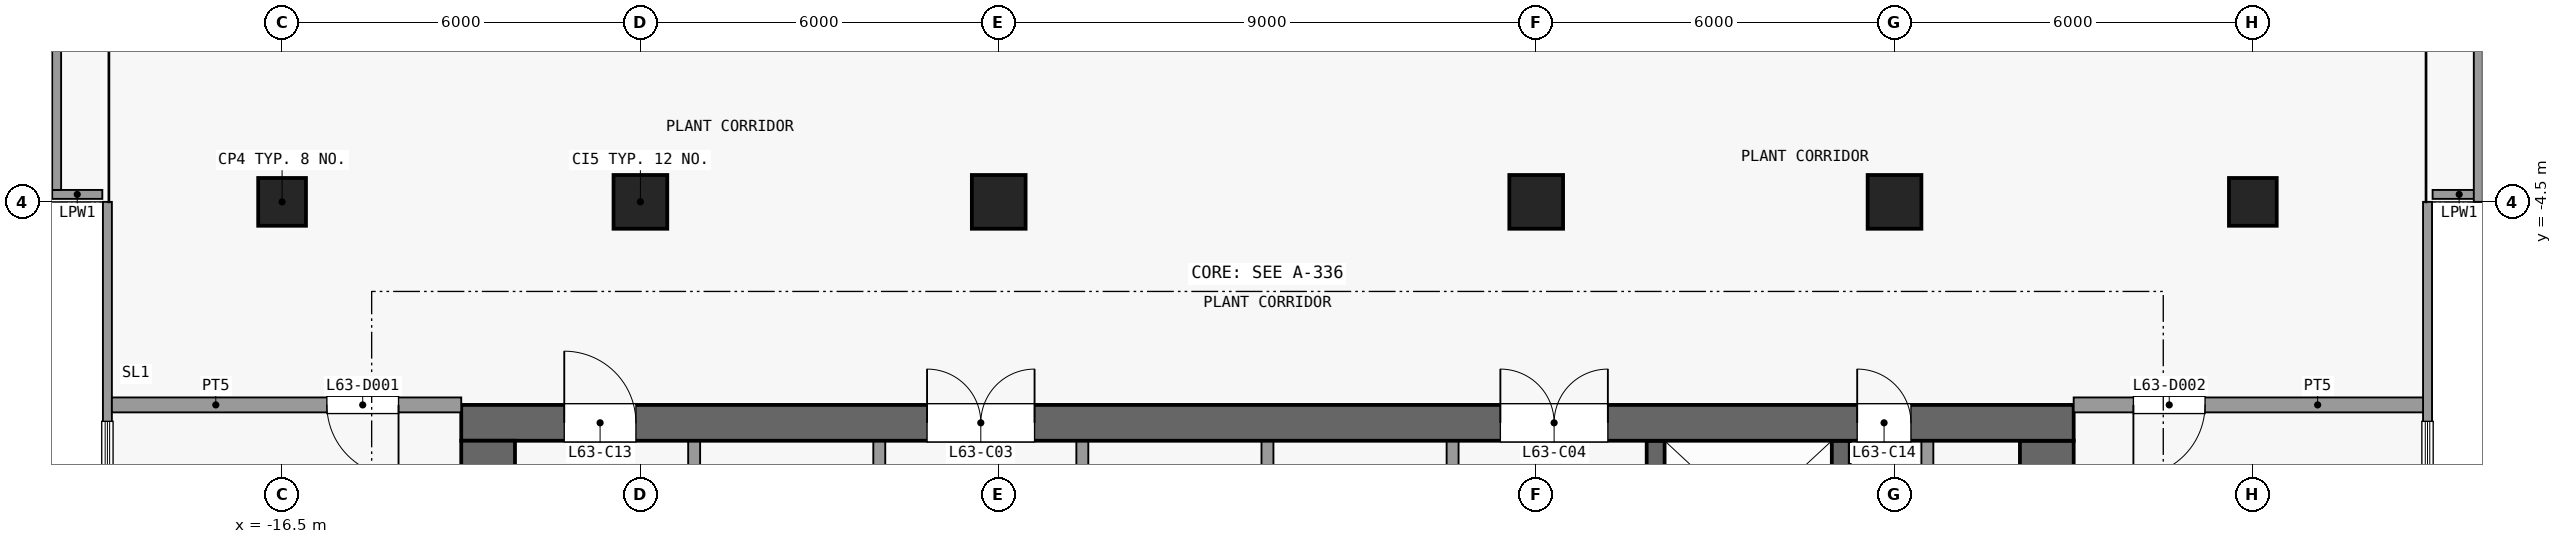
"""IFC4 building model, lengths in metres.
Left out: names, types, materials, properties, quantities, classifications, styles, units other than length and angle.
Written with IfcOpenShell. Run it as: python <this file> out.ifc"""

import sys

from ifc_helpers import new_model, si_unit, direction, frame, frame_2d, origin, origin_2d, place, context, subcontext, project, spatial, rectangle, extrude, element, fill, save


model = new_model("IFC4")
c1 = context("Model", 3, precision=1e-05, world=origin(), true_north=direction((0.0, 1.0)))
c2 = subcontext(c1, "Body", "Model", "MODEL_VIEW")
j1 = project(units=[si_unit("LENGTHUNIT", "METRE"), si_unit("PLANEANGLEUNIT", "RADIAN")], contexts=[c1])
p1 = place(None, origin())
s1 = spatial("IfcSite", under=j1, at=p1, CompositionType="ELEMENT")
p2 = place(p1, origin())
s2 = spatial("IfcBuilding", under=s1, at=p2, CompositionType="ELEMENT")
p3 = place(p2, frame((0.0, 0.0, 248.3)))
s3 = spatial("IfcBuildingStorey", under=s2, at=p3, CompositionType="ELEMENT", Elevation=248.3)
p4 = place(p3, frame((-16.5, -4.5, 0.0), z_axis=(0.0, 0.0, 1.0), x_axis=(1.0, 0.0, 0.0)))
e1 = element("IfcColumn", 1, at=p4, inside=s3, PredefinedType="COLUMN", context=c2, shape_type="SweptSolid", body=[
    extrude(rectangle(XDim=0.8, YDim=0.8, at=origin_2d()), origin(), (0.0, 0.0, 1.0), 7.2),
])
for number, where, z_axis, x_axis in (
    (2, (-10.5, -4.5, 0.0), (0.0, 0.0, 1.0), (1.0, 0.0, 0.0)),
    (3, (-4.5, -4.5, 0.0), (0.0, 0.0, 1.0), (1.0, 0.0, 0.0)),
    (4, (4.5, -4.5, 0.0), (0.0, 0.0, 1.0), (1.0, 0.0, 0.0)),
    (5, (10.5, -4.5, 0.0), (0.0, 0.0, 1.0), (1.0, 0.0, 0.0)),
):
    element("IfcColumn", number, at=place(p3, frame(where, z_axis=z_axis, x_axis=x_axis)), inside=s3, PredefinedType="COLUMN", context=c2, shape_type="SweptSolid", body=[
        extrude(rectangle(XDim=0.9, YDim=0.9, at=origin_2d()), origin(), (0.0, 0.0, 1.0), 7.2),
    ])
p5 = place(p3, frame((16.5, -4.5, 0.0), z_axis=(0.0, 0.0, 1.0), x_axis=(1.0, 0.0, 0.0)))
e6 = element("IfcColumn", 6, at=p5, inside=s3, PredefinedType="COLUMN", context=c2, shape_type="SweptSolid", body=[
    extrude(rectangle(XDim=0.8, YDim=0.8, at=origin_2d()), origin(), (0.0, 0.0, 1.0), 7.2),
])
p6 = place(p3, frame((-13.5, -8.2, 0.0), z_axis=(0.0, 0.0, 1.0), x_axis=(1.0, 0.0, 0.0)))
e7 = element("IfcWall", 7, at=p6, inside=s3, PredefinedType="SHEAR", context=c2, shape_type="SweptSolid", body=[
    extrude(rectangle(XDim=27.0, YDim=0.6, at=frame_2d((13.5, 0.0))), origin(), (0.0, 0.0, 1.0), 6.9),
])
p7 = place(p6, frame((7.8, 0.0, 0.0)))
e8 = element("IfcOpeningElement", 8, at=p7, cuts=e7, PredefinedType="OPENING", context=c2, shape_type="SweptSolid", body=[
    extrude(rectangle(XDim=1.8, YDim=2.1, at=frame_2d((0.9, 1.05))), frame((0.0, 0.31, 0.0), z_axis=(0.0, -1.0, 0.0), x_axis=(1.0, 0.0, 0.0)), (0.0, 0.0, 1.0), 0.62),
])
p8 = place(p6, frame((17.4, 0.0, 0.0)))
e9 = element("IfcOpeningElement", 9, at=p8, cuts=e7, PredefinedType="OPENING", context=c2, shape_type="SweptSolid", body=[
    extrude(rectangle(XDim=1.8, YDim=2.1, at=frame_2d((0.9, 1.05))), frame((0.0, 0.31, 0.0), z_axis=(0.0, -1.0, 0.0), x_axis=(1.0, 0.0, 0.0)), (0.0, 0.0, 1.0), 0.62),
])
p9 = place(p6, frame((1.725, 0.0, 0.0)))
e10 = element("IfcOpeningElement", 10, at=p9, cuts=e7, PredefinedType="OPENING", context=c2, shape_type="SweptSolid", body=[
    extrude(rectangle(XDim=1.2, YDim=2.1, at=frame_2d((0.6, 1.05))), frame((0.0, 0.31, 0.0), z_axis=(0.0, -1.0, 0.0), x_axis=(1.0, 0.0, 0.0)), (0.0, 0.0, 1.0), 0.62),
])
p10 = place(p6, frame((23.375, 0.0, 0.0)))
e11 = element("IfcOpeningElement", 11, at=p10, cuts=e7, PredefinedType="OPENING", context=c2, shape_type="SweptSolid", body=[
    extrude(rectangle(XDim=0.9, YDim=2.1, at=frame_2d((0.45, 1.05))), frame((0.0, 0.31, 0.0), z_axis=(0.0, -1.0, 0.0), x_axis=(1.0, 0.0, 0.0)), (0.0, 0.0, 1.0), 0.62),
])
for number, where, z_axis, x_axis in (
    (12, (-13.05, -24.6, 0.0), (0.0, 0.0, 1.0), (0.0, 1.0, 0.0)),
    (13, (13.05, -24.6, 0.0), (0.0, 0.0, 1.0), (0.0, 1.0, 0.0)),
):
    element("IfcWall", number, at=place(p3, frame(where, z_axis=z_axis, x_axis=x_axis)), inside=s3, PredefinedType="SHEAR", context=c2, shape_type="SweptSolid", body=[
        extrude(rectangle(XDim=16.1, YDim=0.9, at=frame_2d((8.05, 0.0))), origin(), (0.0, 0.0, 1.0), 6.9),
    ])
p11 = place(p3, frame((-9.6, -16.9, 0.0), z_axis=(0.0, 0.0, 1.0), x_axis=(0.0, 1.0, 0.0)))
e14 = element("IfcWall", 14, at=p11, inside=s3, PredefinedType="PARTITIONING", context=c2, shape_type="SweptSolid", body=[
    extrude(rectangle(XDim=8.4, YDim=0.2, at=frame_2d((4.2, 0.0))), origin(), (0.0, 0.0, 1.0), 6.9),
])
p12 = place(p3, frame((-6.5, -22.5, 0.0), z_axis=(0.0, 0.0, 1.0), x_axis=(0.0, 1.0, 0.0)))
e15 = element("IfcWall", 15, at=p12, inside=s3, PredefinedType="PARTITIONING", context=c2, shape_type="SweptSolid", body=[
    extrude(rectangle(XDim=14.0, YDim=0.2, at=frame_2d((7.0, 0.0))), origin(), (0.0, 0.0, 1.0), 6.9),
])
p13 = place(p12, frame((2.28, 0.0, 0.0)))
e16 = element("IfcOpeningElement", 16, at=p13, cuts=e15, PredefinedType="OPENING", context=c2, shape_type="SweptSolid", body=[
    extrude(rectangle(XDim=1.2, YDim=2.1, at=frame_2d((0.6, 1.05))), frame((0.0, 0.11, 0.0), z_axis=(0.0, -1.0, 0.0), x_axis=(1.0, 0.0, 0.0)), (0.0, 0.0, 1.0), 0.22),
])
p14 = place(p12, frame((9.23, 0.0, 0.0)))
e17 = element("IfcOpeningElement", 17, at=p14, cuts=e15, PredefinedType="OPENING", context=c2, shape_type="SweptSolid", body=[
    extrude(rectangle(XDim=1.2, YDim=2.1, at=frame_2d((0.6, 1.05))), frame((0.0, 0.11, 0.0), z_axis=(0.0, -1.0, 0.0), x_axis=(1.0, 0.0, 0.0)), (0.0, 0.0, 1.0), 0.22),
])
p15 = place(p3, frame((-3.1, -8.5, 0.0), z_axis=(0.0, 0.0, 1.0), x_axis=(0.0, -1.0, 0.0)))
e18 = element("IfcWall", 18, at=p15, inside=s3, PredefinedType="PARTITIONING", context=c2, shape_type="SweptSolid", body=[
    extrude(rectangle(XDim=10.97, YDim=0.2, at=frame_2d((5.485, 0.0))), origin(), (0.0, 0.0, 1.0), 6.9),
])
p16 = place(p15, frame((7.74, 0.0, 0.0)))
e19 = element("IfcOpeningElement", 19, at=p16, cuts=e18, PredefinedType="OPENING", context=c2, shape_type="SweptSolid", body=[
    extrude(rectangle(XDim=1.2, YDim=2.1, at=frame_2d((0.6, 1.05))), frame((0.0, 0.11, 0.0), z_axis=(0.0, -1.0, 0.0), x_axis=(1.0, 0.0, 0.0)), (0.0, 0.0, 1.0), 0.22),
])
p17 = place(p15, frame((2.18, 0.0, 0.0)))
e20 = element("IfcOpeningElement", 20, at=p17, cuts=e18, PredefinedType="OPENING", context=c2, shape_type="SweptSolid", body=[
    extrude(rectangle(XDim=1.2, YDim=2.1, at=frame_2d((0.6, 1.05))), frame((0.0, 0.11, 0.0), z_axis=(0.0, -1.0, 0.0), x_axis=(1.0, 0.0, 0.0)), (0.0, 0.0, 1.0), 0.22),
])
p18 = place(p3, frame((0.0, -19.35, 0.0), z_axis=(0.0, 0.0, 1.0), x_axis=(0.0, 1.0, 0.0)))
e21 = element("IfcWall", 21, at=p18, inside=s3, PredefinedType="PARTITIONING", context=c2, shape_type="SweptSolid", body=[
    extrude(rectangle(XDim=10.85, YDim=0.2, at=frame_2d((5.425, 0.0))), origin(), (0.0, 0.0, 1.0), 6.9),
])
p19 = place(p3, frame((3.1, -19.6, 0.0), z_axis=(0.0, 0.0, 1.0), x_axis=(0.0, 1.0, 0.0)))
e22 = element("IfcWall", 22, at=p19, inside=s3, PredefinedType="PARTITIONING", context=c2, shape_type="SweptSolid", body=[
    extrude(rectangle(XDim=11.1, YDim=0.2, at=frame_2d((5.55, 0.0))), origin(), (0.0, 0.0, 1.0), 6.9),
])
p20 = place(p19, frame((2.25, 0.0, 0.0)))
e23 = element("IfcOpeningElement", 23, at=p20, cuts=e22, PredefinedType="OPENING", context=c2, shape_type="SweptSolid", body=[
    extrude(rectangle(XDim=1.2, YDim=2.1, at=frame_2d((0.6, 1.05))), frame((0.0, 0.11, 0.0), z_axis=(0.0, -1.0, 0.0), x_axis=(1.0, 0.0, 0.0)), (0.0, 0.0, 1.0), 0.22),
])
p21 = place(p19, frame((7.75, 0.0, 0.0)))
e24 = element("IfcOpeningElement", 24, at=p21, cuts=e22, PredefinedType="OPENING", context=c2, shape_type="SweptSolid", body=[
    extrude(rectangle(XDim=1.2, YDim=2.1, at=frame_2d((0.6, 1.05))), frame((0.0, 0.11, 0.0), z_axis=(0.0, -1.0, 0.0), x_axis=(1.0, 0.0, 0.0)), (0.0, 0.0, 1.0), 0.22),
])
p22 = place(p3, frame((6.5, -22.55, 0.0), z_axis=(0.0, 0.0, 1.0), x_axis=(0.0, 1.0, 0.0)))
e25 = element("IfcWall", 25, at=p22, inside=s3, PredefinedType="SHEAR", context=c2, shape_type="SweptSolid", body=[
    extrude(rectangle(XDim=14.05, YDim=0.3, at=frame_2d((7.025, 0.0))), origin(), (0.0, 0.0, 1.0), 6.9),
])
p23 = place(p22, frame((1.05, 0.0, 0.0)))
e26 = element("IfcOpeningElement", 26, at=p23, cuts=e25, PredefinedType="OPENING", context=c2, shape_type="SweptSolid", body=[
    extrude(rectangle(XDim=1.1, YDim=2.1, at=frame_2d((0.55, 1.05))), frame((0.0, 0.16, 0.0), z_axis=(0.0, -1.0, 0.0), x_axis=(1.0, 0.0, 0.0)), (0.0, 0.0, 1.0), 0.32),
])
p24 = place(p3, frame((9.6, -17.2, 0.0), z_axis=(0.0, 0.0, 1.0), x_axis=(0.0, 1.0, 0.0)))
e27 = element("IfcWall", 27, at=p24, inside=s3, PredefinedType="SHEAR", context=c2, shape_type="SweptSolid", body=[
    extrude(rectangle(XDim=8.7, YDim=0.3, at=frame_2d((4.35, 0.0))), origin(), (0.0, 0.0, 1.0), 6.9),
])
p25 = place(p3, frame((11.05, -8.5, 0.0), z_axis=(0.0, 0.0, 1.0), x_axis=(0.0, -1.0, 0.0)))
e28 = element("IfcWall", 28, at=p25, inside=s3, PredefinedType="PARTITIONING", context=c2, shape_type="SweptSolid", body=[
    extrude(rectangle(XDim=6.2, YDim=0.2, at=frame_2d((3.1, 0.0))), origin(), (0.0, 0.0, 1.0), 6.9),
])
p26 = place(p25, frame((2.6, 0.0, 0.0)))
e29 = element("IfcOpeningElement", 29, at=p26, cuts=e28, PredefinedType="OPENING", context=c2, shape_type="SweptSolid", body=[
    extrude(rectangle(XDim=0.9, YDim=2.1, at=frame_2d((0.45, 1.05))), frame((0.0, 0.11, 0.0), z_axis=(0.0, -1.0, 0.0), x_axis=(1.0, 0.0, 0.0)), (0.0, 0.0, 1.0), 0.22),
])
p27 = place(p3, frame((19.425, -4.5, 0.0), z_axis=(0.0, 0.0, 1.0), x_axis=(0.0, -1.0, 0.0)))
e30 = element("IfcWall", 30, at=p27, inside=s3, PredefinedType="SOLIDWALL", context=c2, shape_type="SweptSolid", body=[
    extrude(rectangle(XDim=16.35, YDim=0.15, at=frame_2d((8.175, 0.0))), origin(), (0.0, 0.0, 1.0), 6.9),
])
p28 = place(p27, frame((10.875, 0.0, 1.2)))
e31 = element("IfcOpeningElement", 31, at=p28, cuts=e30, PredefinedType="OPENING", context=c2, shape_type="SweptSolid", body=[
    extrude(rectangle(XDim=3.6, YDim=3.0, at=frame_2d((1.8, 1.5))), frame((0.0, 0.085, 0.0), z_axis=(0.0, -1.0, 0.0), x_axis=(1.0, 0.0, 0.0)), (0.0, 0.0, 1.0), 0.17),
])
p29 = place(p27, frame((3.675, 0.0, 1.2)))
e32 = element("IfcOpeningElement", 32, at=p29, cuts=e30, PredefinedType="OPENING", context=c2, shape_type="SweptSolid", body=[
    extrude(rectangle(XDim=2.625, YDim=3.0, at=frame_2d((1.312, 1.5))), frame((0.0, 0.085, 0.0), z_axis=(0.0, -1.0, 0.0), x_axis=(1.0, 0.0, 0.0)), (0.0, 0.0, 1.0), 0.17),
])
p30 = place(p3, frame((-19.425, -20.85, 0.0), z_axis=(0.0, 0.0, 1.0), x_axis=(0.0, 1.0, 0.0)))
e33 = element("IfcWall", 33, at=p30, inside=s3, PredefinedType="SOLIDWALL", context=c2, shape_type="SweptSolid", body=[
    extrude(rectangle(XDim=16.35, YDim=0.15, at=frame_2d((8.175, 0.0))), origin(), (0.0, 0.0, 1.0), 6.9),
])
p31 = place(p30, frame((1.875, 0.0, 1.2)))
e34 = element("IfcOpeningElement", 34, at=p31, cuts=e33, PredefinedType="OPENING", context=c2, shape_type="SweptSolid", body=[
    extrude(rectangle(XDim=3.6, YDim=3.0, at=frame_2d((1.8, 1.5))), frame((0.0, 0.085, 0.0), z_axis=(0.0, -1.0, 0.0), x_axis=(1.0, 0.0, 0.0)), (0.0, 0.0, 1.0), 0.17),
])
p32 = place(p30, frame((10.05, 0.0, 1.2)))
e35 = element("IfcOpeningElement", 35, at=p32, cuts=e33, PredefinedType="OPENING", context=c2, shape_type="SweptSolid", body=[
    extrude(rectangle(XDim=2.625, YDim=3.0, at=frame_2d((1.312, 1.5))), frame((0.0, 0.085, 0.0), z_axis=(0.0, -1.0, 0.0), x_axis=(1.0, 0.0, 0.0)), (0.0, 0.0, 1.0), 0.17),
])
p33 = place(p3, frame((-19.51, -4.375, 0.0), z_axis=(0.0, 0.0, 1.0), x_axis=(-1.0, 0.0, 0.0)))
e36 = element("IfcWall", 36, at=p33, inside=s3, PredefinedType="PARAPET", context=c2, shape_type="SweptSolid", body=[
    extrude(rectangle(XDim=0.84, YDim=0.15, at=frame_2d((0.42, 0.0))), origin(), (0.0, 0.0, 1.0), 1.15),
])
p34 = place(p3, frame((-20.275, -4.3, 0.0), z_axis=(0.0, 0.0, 1.0), x_axis=(0.0, 1.0, 0.0)))
e37 = element("IfcWall", 37, at=p34, inside=s3, PredefinedType="PARAPET", context=c2, shape_type="SweptSolid", body=[
    extrude(rectangle(XDim=5.8, YDim=0.15, at=frame_2d((2.9, 0.0))), origin(), (0.0, 0.0, 1.0), 1.15),
])
p35 = place(p3, frame((20.4, -4.375, 0.0), z_axis=(0.0, 0.0, 1.0), x_axis=(-1.0, 0.0, 0.0)))
e38 = element("IfcWall", 38, at=p35, inside=s3, PredefinedType="PARAPET", context=c2, shape_type="SweptSolid", body=[
    extrude(rectangle(XDim=0.89, YDim=0.15, at=frame_2d((0.445, 0.0))), origin(), (0.0, 0.0, 1.0), 1.15),
])
p36 = place(p3, frame((20.275, 1.3, 0.0), z_axis=(0.0, 0.0, 1.0), x_axis=(0.0, -1.0, 0.0)))
e39 = element("IfcWall", 39, at=p36, inside=s3, PredefinedType="PARAPET", context=c2, shape_type="SweptSolid", body=[
    extrude(rectangle(XDim=5.8, YDim=0.15, at=frame_2d((2.9, 0.0))), origin(), (0.0, 0.0, 1.0), 1.15),
])
p37 = place(p3, frame((-19.35, -7.9, 0.0), z_axis=(0.0, 0.0, 1.0), x_axis=(1.0, 0.0, 0.0)))
e40 = element("IfcWall", 40, at=p37, inside=s3, PredefinedType="PARTITIONING", context=c2, shape_type="SweptSolid", body=[
    extrude(rectangle(XDim=5.85, YDim=0.25, at=frame_2d((2.925, 0.0))), origin(), (0.0, 0.0, 1.0), 6.9),
])
p38 = place(p37, frame((3.6, 0.0, 0.0)))
e41 = element("IfcOpeningElement", 41, at=p38, cuts=e40, PredefinedType="OPENING", context=c2, shape_type="SweptSolid", body=[
    extrude(rectangle(XDim=1.2, YDim=2.1, at=frame_2d((0.6, 1.05))), frame((0.0, 0.135, 0.0), z_axis=(0.0, -1.0, 0.0), x_axis=(1.0, 0.0, 0.0)), (0.0, 0.0, 1.0), 0.27),
])
p39 = place(p3, frame((13.5, -7.9, 0.0), z_axis=(0.0, 0.0, 1.0), x_axis=(1.0, 0.0, 0.0)))
e42 = element("IfcWall", 42, at=p39, inside=s3, PredefinedType="PARTITIONING", context=c2, shape_type="SweptSolid", body=[
    extrude(rectangle(XDim=5.85, YDim=0.25, at=frame_2d((2.925, 0.0))), origin(), (0.0, 0.0, 1.0), 6.9),
])
p40 = place(p39, frame((1.0, 0.0, 0.0)))
e43 = element("IfcOpeningElement", 43, at=p40, cuts=e42, PredefinedType="OPENING", context=c2, shape_type="SweptSolid", body=[
    extrude(rectangle(XDim=1.2, YDim=2.1, at=frame_2d((0.6, 1.05))), frame((0.0, 0.135, 0.0), z_axis=(0.0, -1.0, 0.0), x_axis=(1.0, 0.0, 0.0)), (0.0, 0.0, 1.0), 0.27),
])
p41 = place(p7, origin())
e44 = element("IfcDoor", 44, at=p41, inside=s3, OperationType="DOUBLE_DOOR_SINGLE_SWING", PredefinedType="DOOR", context=c2, shape_type="SweptSolid", body=[
    extrude(rectangle(XDim=1.8, YDim=2.1, at=frame_2d((0.9, 1.05))), frame((0.0, 0.025, 0.0), z_axis=(0.0, -1.0, 0.0), x_axis=(1.0, 0.0, 0.0)), (0.0, 0.0, 1.0), 0.05),
])
fill(e8, e44)
p42 = place(p8, origin())
e45 = element("IfcDoor", 45, at=p42, inside=s3, OperationType="DOUBLE_DOOR_SINGLE_SWING", PredefinedType="DOOR", context=c2, shape_type="SweptSolid", body=[
    extrude(rectangle(XDim=1.8, YDim=2.1, at=frame_2d((0.9, 1.05))), frame((0.0, 0.025, 0.0), z_axis=(0.0, -1.0, 0.0), x_axis=(1.0, 0.0, 0.0)), (0.0, 0.0, 1.0), 0.05),
])
fill(e9, e45)
p43 = place(p9, origin())
e46 = element("IfcDoor", 46, at=p43, inside=s3, OperationType="SINGLE_SWING_LEFT", PredefinedType="DOOR", context=c2, shape_type="SweptSolid", body=[
    extrude(rectangle(XDim=1.2, YDim=2.1, at=frame_2d((0.6, 1.05))), frame((0.0, 0.025, 0.0), z_axis=(0.0, -1.0, 0.0), x_axis=(1.0, 0.0, 0.0)), (0.0, 0.0, 1.0), 0.05),
])
fill(e10, e46)
p44 = place(p10, origin())
e47 = element("IfcDoor", 47, at=p44, inside=s3, OperationType="SINGLE_SWING_LEFT", PredefinedType="DOOR", context=c2, shape_type="SweptSolid", body=[
    extrude(rectangle(XDim=0.9, YDim=2.1, at=frame_2d((0.45, 1.05))), frame((0.0, 0.025, 0.0), z_axis=(0.0, -1.0, 0.0), x_axis=(1.0, 0.0, 0.0)), (0.0, 0.0, 1.0), 0.05),
])
fill(e11, e47)
p45 = place(p29, origin())
e48 = element("IfcWindow", 48, at=p45, inside=s3, PartitioningType="SINGLE_PANEL", PredefinedType="WINDOW", context=c2, shape_type="SweptSolid", body=[
    extrude(rectangle(XDim=2.625, YDim=3.0, at=frame_2d((1.312, 1.5))), frame((0.0, 0.03, 0.0), z_axis=(0.0, -1.0, 0.0), x_axis=(1.0, 0.0, 0.0)), (0.0, 0.0, 1.0), 0.06),
])
fill(e32, e48)
p46 = place(p32, origin())
e49 = element("IfcWindow", 49, at=p46, inside=s3, PartitioningType="SINGLE_PANEL", PredefinedType="WINDOW", context=c2, shape_type="SweptSolid", body=[
    extrude(rectangle(XDim=2.625, YDim=3.0, at=frame_2d((1.312, 1.5))), frame((0.0, 0.03, 0.0), z_axis=(0.0, -1.0, 0.0), x_axis=(1.0, 0.0, 0.0)), (0.0, 0.0, 1.0), 0.06),
])
fill(e35, e49)
p47 = place(p38, origin())
e50 = element("IfcDoor", 50, at=p47, inside=s3, OperationType="SINGLE_SWING_RIGHT", PredefinedType="DOOR", context=c2, shape_type="SweptSolid", body=[
    extrude(rectangle(XDim=1.2, YDim=2.1, at=frame_2d((0.6, 1.05))), frame((0.0, 0.025, 0.0), z_axis=(0.0, -1.0, 0.0), x_axis=(1.0, 0.0, 0.0)), (0.0, 0.0, 1.0), 0.05),
])
fill(e41, e50)
p48 = place(p40, origin())
e51 = element("IfcDoor", 51, at=p48, inside=s3, OperationType="SINGLE_SWING_LEFT", PredefinedType="DOOR", context=c2, shape_type="SweptSolid", body=[
    extrude(rectangle(XDim=1.2, YDim=2.1, at=frame_2d((0.6, 1.05))), frame((0.0, 0.025, 0.0), z_axis=(0.0, -1.0, 0.0), x_axis=(1.0, 0.0, 0.0)), (0.0, 0.0, 1.0), 0.05),
])
fill(e43, e51)
save(model, sys.argv[1])
